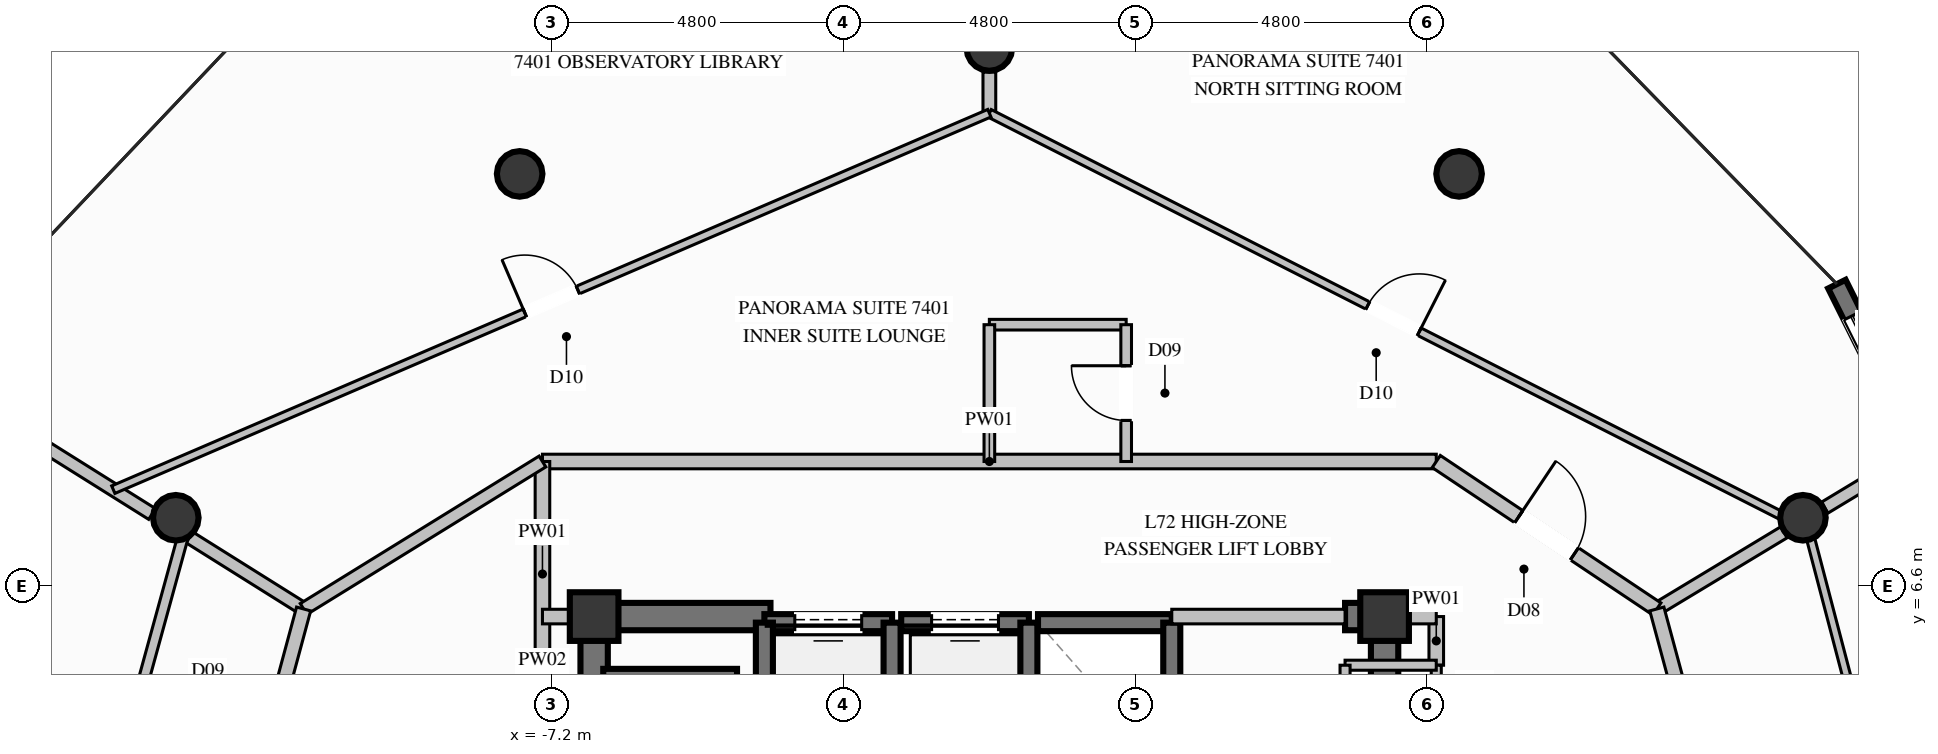
"""IFC4 building model, lengths in metres.
Left out: names, types, materials, properties, quantities, classifications, styles, units other than length and angle.
Written with IfcOpenShell. Run it as: python <this file> out.ifc"""

import sys

from ifc_helpers import new_model, si_unit, direction, frame, frame_2d, origin, origin_2d, place, context, subcontext, project, spatial, rectangle, circle, extrude, element, fill, save


model = new_model("IFC4")
c1 = context("Model", 3, precision=1e-05, world=origin(), true_north=direction((0.0, 1.0)))
c2 = subcontext(c1, "Body", "Model", "MODEL_VIEW")
j1 = project(units=[si_unit("LENGTHUNIT", "METRE"), si_unit("PLANEANGLEUNIT", "RADIAN")], contexts=[c1])
p1 = place(None, origin())
s1 = spatial("IfcSite", under=j1, at=p1, CompositionType="ELEMENT")
p2 = place(p1, origin())
s2 = spatial("IfcBuilding", under=s1, at=p2, CompositionType="ELEMENT")
p3 = place(p2, frame((0.0, 0.0, 278.2)))
s3 = spatial("IfcBuildingStorey", under=s2, at=p3, CompositionType="ELEMENT", Elevation=278.2)
for number, where, z_axis, x_axis in (
    (1, (6.5, 6.1, 0.0), (0.0, 0.0, 1.0), (1.0, 0.0, 0.0)),
    (2, (-6.5, 6.1, 0.0), (0.0, 0.0, 1.0), (1.0, 0.0, 0.0)),
):
    element("IfcColumn", number, at=place(p3, frame(where, z_axis=z_axis, x_axis=x_axis)), inside=s3, PredefinedType="COLUMN", context=c2, shape_type="SweptSolid", body=[
        extrude(rectangle(XDim=0.8, YDim=0.8, at=origin_2d()), origin(), (0.0, 0.0, 1.0), 3.8),
    ])
p4 = place(p3, frame((-6.275, 6.1, 0.0), z_axis=(0.0, 0.0, 1.0), x_axis=(1.0, 0.0, 0.0)))
e3 = element("IfcWall", 3, at=p4, inside=s3, PredefinedType="SHEAR", context=c2, shape_type="SweptSolid", body=[
    extrude(rectangle(XDim=2.675, YDim=0.45, at=frame_2d((1.337, 0.0))), origin(), (0.0, 0.0, 1.0), 3.8),
])
p5 = place(p3, frame((5.85, 6.1, 0.0), z_axis=(0.0, 0.0, 1.0), x_axis=(1.0, 0.0, 0.0)))
e4 = element("IfcWall", 4, at=p5, inside=s3, PredefinedType="SHEAR", context=c2, shape_type="SweptSolid", body=[
    extrude(rectangle(XDim=0.425, YDim=0.45, at=frame_2d((0.212, 0.0))), origin(), (0.0, 0.0, 1.0), 3.8),
])
p6 = place(p3, frame((-6.5, 2.35, 0.0), z_axis=(0.0, 0.0, 1.0), x_axis=(0.0, 1.0, 0.0)))
e5 = element("IfcWall", 5, at=p6, inside=s3, PredefinedType="SHEAR", context=c2, shape_type="SweptSolid", body=[
    extrude(rectangle(XDim=3.975, YDim=0.45, at=frame_2d((1.987, 0.0))), origin(), (0.0, 0.0, 1.0), 3.8),
])
p7 = place(p3, frame((6.5, 3.35, 0.0), z_axis=(0.0, 0.0, 1.0), x_axis=(0.0, 1.0, 0.0)))
e6 = element("IfcWall", 6, at=p7, inside=s3, PredefinedType="SHEAR", context=c2, shape_type="SweptSolid", body=[
    extrude(rectangle(XDim=2.975, YDim=0.45, at=frame_2d((1.487, 0.0))), origin(), (0.0, 0.0, 1.0), 3.8),
])
for number, where, z_axis, x_axis in (
    (7, (13.38, 7.725, 0.0), (0.0, 0.0, 1.0), (1.0, 0.0, 0.0)),
    (8, (7.725, 13.38, 0.0), (0.0, 0.0, 1.0), (1.0, 0.0, 0.0)),
    (9, (0.0, 15.45, 0.0), (0.0, 0.0, 1.0), (1.0, 0.0, 0.0)),
    (10, (-7.725, 13.38, 0.0), (0.0, 0.0, 1.0), (1.0, 0.0, 0.0)),
    (11, (-13.38, 7.725, 0.0), (0.0, 0.0, 1.0), (1.0, 0.0, 0.0)),
):
    element("IfcColumn", number, at=place(p3, frame(where, z_axis=z_axis, x_axis=x_axis)), inside=s3, PredefinedType="COLUMN", context=c2, shape_type="SweptSolid", body=[
        extrude(circle(Radius=0.375, at=origin_2d()), origin(), (0.0, 0.0, 1.0), 3.8),
    ])
p8 = place(p3, frame((13.939, 11.567, 0.0), z_axis=(0.0, 0.0, 1.0), x_axis=(0.44621303713, -0.894926771024, 0.0)))
e12 = element("IfcWall", 12, at=p8, inside=s3, PredefinedType="SOLIDWALL", context=c2, shape_type="SweptSolid", body=[
    extrude(rectangle(XDim=6.053, YDim=0.32, at=frame_2d((3.026, 0.0))), origin(), (0.0, 0.0, 1.0), 3.57),
])
p9 = place(p8, frame((0.578, 0.0, 0.35)))
e13 = element("IfcOpeningElement", 13, at=p9, cuts=e12, PredefinedType="OPENING", context=c2, shape_type="SweptSolid", body=[
    extrude(rectangle(XDim=1.8, YDim=2.6, at=frame_2d((0.9, 1.3))), frame((0.0, 0.17, 0.0), z_axis=(0.0, -1.0, 0.0), x_axis=(1.0, 0.0, 0.0)), (0.0, 0.0, 1.0), 0.34),
])
p10 = place(p3, frame((-1.6, 6.0, 0.0), z_axis=(0.0, 0.0, 1.0), x_axis=(-1.0, 0.0, 0.0)))
e14 = element("IfcWall", 14, at=p10, inside=s3, PredefinedType="SOLIDWALL", context=c2, shape_type="SweptSolid", body=[
    extrude(rectangle(XDim=2.1, YDim=0.28, at=frame_2d((1.05, 0.0))), origin(), (0.0, 0.0, 1.0), 3.57),
])
p11 = place(p10, frame((0.5, 0.0, 0.0)))
e15 = element("IfcOpeningElement", 15, at=p11, cuts=e14, PredefinedType="OPENING", context=c2, shape_type="SweptSolid", body=[
    extrude(rectangle(XDim=1.1, YDim=2.2, at=frame_2d((0.55, 1.1))), frame((0.0, 0.15, 0.0), z_axis=(0.0, -1.0, 0.0), x_axis=(1.0, 0.0, 0.0)), (0.0, 0.0, 1.0), 0.3),
])
for number, where, z_axis, x_axis in (
    (16, (-3.7, 6.0, 0.0), (0.0, 0.0, 1.0), (0.0, -1.0, 0.0)),
    (17, (-1.6, 3.5, 0.0), (0.0, 0.0, 1.0), (0.0, 1.0, 0.0)),
):
    element("IfcWall", number, at=place(p3, frame(where, z_axis=z_axis, x_axis=x_axis)), inside=s3, PredefinedType="SOLIDWALL", context=c2, shape_type="SweptSolid", body=[
        extrude(rectangle(XDim=2.5, YDim=0.28, at=frame_2d((1.25, 0.0))), origin(), (0.0, 0.0, 1.0), 3.57),
    ])
p12 = place(p3, frame((0.65, 6.0, 0.0), z_axis=(0.0, 0.0, 1.0), x_axis=(-1.0, 0.0, 0.0)))
e18 = element("IfcWall", 18, at=p12, inside=s3, PredefinedType="SOLIDWALL", context=c2, shape_type="SweptSolid", body=[
    extrude(rectangle(XDim=2.1, YDim=0.28, at=frame_2d((1.05, 0.0))), origin(), (0.0, 0.0, 1.0), 3.57),
])
p13 = place(p12, frame((0.5, 0.0, 0.0)))
e19 = element("IfcOpeningElement", 19, at=p13, cuts=e18, PredefinedType="OPENING", context=c2, shape_type="SweptSolid", body=[
    extrude(rectangle(XDim=1.1, YDim=2.2, at=frame_2d((0.55, 1.1))), frame((0.0, 0.15, 0.0), z_axis=(0.0, -1.0, 0.0), x_axis=(1.0, 0.0, 0.0)), (0.0, 0.0, 1.0), 0.3),
])
p14 = place(p3, frame((0.65, 3.5, 0.0), z_axis=(0.0, 0.0, 1.0), x_axis=(0.0, 1.0, 0.0)))
e20 = element("IfcWall", 20, at=p14, inside=s3, PredefinedType="SOLIDWALL", context=c2, shape_type="SweptSolid", body=[
    extrude(rectangle(XDim=2.5, YDim=0.28, at=frame_2d((1.25, 0.0))), origin(), (0.0, 0.0, 1.0), 3.57),
])
p15 = place(p3, frame((3.0, 6.0, 0.0), z_axis=(0.0, 0.0, 1.0), x_axis=(-1.0, 0.0, 0.0)))
e21 = element("IfcWall", 21, at=p15, inside=s3, PredefinedType="SOLIDWALL", context=c2, shape_type="SweptSolid", body=[
    extrude(rectangle(XDim=2.2, YDim=0.28, at=frame_2d((1.1, 0.0))), origin(), (0.0, 0.0, 1.0), 3.57),
])
p16 = place(p3, frame((3.0, 3.5, 0.0), z_axis=(0.0, 0.0, 1.0), x_axis=(0.0, 1.0, 0.0)))
e22 = element("IfcWall", 22, at=p16, inside=s3, PredefinedType="SOLIDWALL", context=c2, shape_type="SweptSolid", body=[
    extrude(rectangle(XDim=2.5, YDim=0.28, at=frame_2d((1.25, 0.0))), origin(), (0.0, 0.0, 1.0), 3.57),
])
p17 = place(p3, frame((-4.15, 5.1, 0.0), z_axis=(0.0, 0.0, 1.0), x_axis=(-1.0, 0.0, 0.0)))
e23 = element("IfcWall", 23, at=p17, inside=s3, PredefinedType="SOLIDWALL", context=c2, shape_type="SweptSolid", body=[
    extrude(rectangle(XDim=2.2, YDim=0.28, at=frame_2d((1.1, 0.0))), origin(), (0.0, 0.0, 1.0), 3.57),
])
p18 = place(p3, frame((-7.35, 8.65, 0.0), z_axis=(0.0, 0.0, 1.0), x_axis=(1.0, 0.0, 0.0)))
e24 = element("IfcWall", 24, at=p18, inside=s3, PredefinedType="PARTITIONING", context=c2, shape_type="SweptSolid", body=[
    extrude(rectangle(XDim=14.7, YDim=0.24, at=frame_2d((7.35, 0.0))), origin(), (0.0, 0.0, 1.0), 3.57),
])
p19 = place(p3, frame((3.0, 6.1, 0.0), z_axis=(0.0, 0.0, 1.0), x_axis=(1.0, 0.0, 0.0)))
e25 = element("IfcWall", 25, at=p19, inside=s3, PredefinedType="PARTITIONING", context=c2, shape_type="SweptSolid", body=[
    extrude(rectangle(XDim=2.85, YDim=0.24, at=frame_2d((1.425, 0.0))), origin(), (0.0, 0.0, 1.0), 2.655),
])
p20 = place(p3, frame((7.35, 5.3, 0.0), z_axis=(0.0, 0.0, 1.0), x_axis=(0.0, 1.0, 0.0)))
e26 = element("IfcWall", 26, at=p20, inside=s3, PredefinedType="PARTITIONING", context=c2, shape_type="SweptSolid", body=[
    extrude(rectangle(XDim=0.8, YDim=0.24, at=frame_2d((0.4, 0.0))), origin(), (0.0, 0.0, 1.0), 2.655),
])
p21 = place(p3, frame((6.5, 6.1, 0.0), z_axis=(0.0, 0.0, 1.0), x_axis=(1.0, 0.0, 0.0)))
e27 = element("IfcWall", 27, at=p21, inside=s3, PredefinedType="PARTITIONING", context=c2, shape_type="SweptSolid", body=[
    extrude(rectangle(XDim=0.85, YDim=0.24, at=frame_2d((0.425, 0.0))), origin(), (0.0, 0.0, 1.0), 3.011),
])
p22 = place(p3, frame((-7.35, 4.95, 0.0), z_axis=(0.0, 0.0, 1.0), x_axis=(0.0, 1.0, 0.0)))
e28 = element("IfcWall", 28, at=p22, inside=s3, PredefinedType="PARTITIONING", context=c2, shape_type="SweptSolid", body=[
    extrude(rectangle(XDim=3.7, YDim=0.24, at=frame_2d((1.85, 0.0))), origin(), (0.0, 0.0, 1.0), 2.655),
])
p23 = place(p3, frame((-7.35, 6.1, 0.0), z_axis=(0.0, 0.0, 1.0), x_axis=(1.0, 0.0, 0.0)))
e29 = element("IfcWall", 29, at=p23, inside=s3, PredefinedType="PARTITIONING", context=c2, shape_type="SweptSolid", body=[
    extrude(rectangle(XDim=0.85, YDim=0.24, at=frame_2d((0.425, 0.0))), origin(), (0.0, 0.0, 1.0), 3.011),
])
p24 = place(p3, frame((7.35, 3.35, 0.0), z_axis=(0.0, 0.0, 1.0), x_axis=(0.0, 1.0, 0.0)))
e30 = element("IfcWall", 30, at=p24, inside=s3, PredefinedType="PARTITIONING", context=c2, shape_type="SweptSolid", body=[
    extrude(rectangle(XDim=1.95, YDim=0.165, at=frame_2d((0.975, 0.0))), origin(), (0.0, 0.0, 1.0), 3.57),
])
p25 = place(p24, frame((0.5, 0.0, 0.0)))
e31 = element("IfcOpeningElement", 31, at=p25, cuts=e30, PredefinedType="OPENING", context=c2, shape_type="SweptSolid", body=[
    extrude(rectangle(XDim=0.95, YDim=2.1, at=frame_2d((0.475, 1.05))), frame((0.0, 0.093, 0.0), z_axis=(0.0, -1.0, 0.0), x_axis=(1.0, 0.0, 0.0)), (0.0, 0.0, 1.0), 0.185),
])
p26 = place(p3, frame((7.35, 5.3, 0.0), z_axis=(0.0, 0.0, 1.0), x_axis=(-1.0, 0.0, 0.0)))
e32 = element("IfcWall", 32, at=p26, inside=s3, PredefinedType="PARTITIONING", context=c2, shape_type="SweptSolid", body=[
    extrude(rectangle(XDim=1.5, YDim=0.165, at=frame_2d((0.75, 0.0))), origin(), (0.0, 0.0, 1.0), 2.655),
])
p27 = place(p3, frame((5.85, 5.3, 0.0), z_axis=(0.0, 0.0, 1.0), x_axis=(0.0, -1.0, 0.0)))
e33 = element("IfcWall", 33, at=p27, inside=s3, PredefinedType="PARTITIONING", context=c2, shape_type="SweptSolid", body=[
    extrude(rectangle(XDim=1.95, YDim=0.165, at=frame_2d((0.975, 0.0))), origin(), (0.0, 0.0, 1.0), 2.655),
])
p28 = place(p3, frame((10.978, 6.225, 0.0), z_axis=(0.0, 0.0, 1.0), x_axis=(0.856173916647, 0.516687743664, 0.0)))
e34 = element("IfcWall", 34, at=p28, inside=s3, PredefinedType="PARTITIONING", context=c2, shape_type="SweptSolid", body=[
    extrude(rectangle(XDim=2.439, YDim=0.21, at=frame_2d((1.219, 0.0))), origin(), (0.0, 0.0, 1.0), 3.011),
])
p29 = place(p3, frame((13.738, 7.891, 0.0), z_axis=(0.0, 0.0, 1.0), x_axis=(0.856151167904, 0.516725437439, 0.0)))
e35 = element("IfcWall", 35, at=p29, inside=s3, PredefinedType="PARTITIONING", context=c2, shape_type="SweptSolid", body=[
    extrude(rectangle(XDim=1.786, YDim=0.21, at=frame_2d((0.893, 0.0))), origin(), (0.0, 0.0, 1.0), 3.57),
])
p30 = place(p3, frame((-11.278, 6.225, 0.0), z_axis=(0.0, 0.0, 1.0), x_axis=(-0.847328563413, 0.531069021525, 0.0)))
e36 = element("IfcWall", 36, at=p30, inside=s3, PredefinedType="PARTITIONING", context=c2, shape_type="SweptSolid", body=[
    extrude(rectangle(XDim=2.214, YDim=0.21, at=frame_2d((1.107, 0.0))), origin(), (0.0, 0.0, 1.0), 3.011),
])
p31 = place(p3, frame((-13.77, 7.787, 0.0), z_axis=(0.0, 0.0, 1.0), x_axis=(-0.847396390163, 0.530960787572, 0.0)))
e37 = element("IfcWall", 37, at=p31, inside=s3, PredefinedType="PARTITIONING", context=c2, shape_type="SweptSolid", body=[
    extrude(rectangle(XDim=3.9, YDim=0.21, at=frame_2d((1.95, 0.0))), origin(), (0.0, 0.0, 1.0), 3.57),
])
for number, where, z_axis, x_axis in (
    (38, (0.0, 10.9, 0.0), (0.0, 0.0, 1.0), (1.0, 0.0, 0.0)),
    (39, (0.0, 10.9, 0.0), (0.0, 0.0, 1.0), (0.0, -1.0, 0.0)),
):
    element("IfcWall", number, at=place(p3, frame(where, z_axis=z_axis, x_axis=x_axis)), inside=s3, PredefinedType="PLUMBINGWALL", context=c2, shape_type="SweptSolid", body=[
        extrude(rectangle(XDim=2.25, YDim=0.175, at=frame_2d((1.125, 0.0))), origin(), (0.0, 0.0, 1.0), 3.57),
    ])
p32 = place(p3, frame((2.25, 8.65, 0.0), z_axis=(0.0, 0.0, 1.0), x_axis=(0.0, 1.0, 0.0)))
e40 = element("IfcWall", 40, at=p32, inside=s3, PredefinedType="PLUMBINGWALL", context=c2, shape_type="SweptSolid", body=[
    extrude(rectangle(XDim=2.25, YDim=0.175, at=frame_2d((1.125, 0.0))), origin(), (0.0, 0.0, 1.0), 3.57),
])
p33 = place(p32, frame((0.675, 0.0, 0.0)))
e41 = element("IfcOpeningElement", 41, at=p33, cuts=e40, PredefinedType="OPENING", context=c2, shape_type="SweptSolid", body=[
    extrude(rectangle(XDim=0.9, YDim=2.1, at=frame_2d((0.45, 1.05))), frame((0.0, 0.098, 0.0), z_axis=(0.0, -1.0, 0.0), x_axis=(1.0, 0.0, 0.0)), (0.0, 0.0, 1.0), 0.195),
])
p34 = place(p3, frame((-11.278, 6.225, 0.0), z_axis=(0.0, 0.0, 1.0), x_axis=(0.85092385233, 0.525289060933, 0.0)))
e42 = element("IfcWall", 42, at=p34, inside=s3, PredefinedType="PARTITIONING", context=c2, shape_type="SweptSolid", body=[
    extrude(rectangle(XDim=4.616, YDim=0.21, at=frame_2d((2.308, 0.0))), origin(), (0.0, 0.0, 1.0), 3.57),
])
p35 = place(p3, frame((7.35, 8.65, 0.0), z_axis=(0.0, 0.0, 1.0), x_axis=(0.831395547998, -0.555681062094, 0.0)))
e43 = element("IfcWall", 43, at=p35, inside=s3, PredefinedType="PARTITIONING", context=c2, shape_type="SweptSolid", body=[
    extrude(rectangle(XDim=4.364, YDim=0.24, at=frame_2d((2.182, 0.0))), origin(), (0.0, 0.0, 1.0), 3.57),
])
p36 = place(p35, frame((1.632, 0.0, 0.0)))
e44 = element("IfcOpeningElement", 44, at=p36, cuts=e43, PredefinedType="OPENING", context=c2, shape_type="SweptSolid", body=[
    extrude(rectangle(XDim=1.1, YDim=2.3, at=frame_2d((0.55, 1.15))), frame((0.0, 0.13, 0.0), z_axis=(0.0, -1.0, 0.0), x_axis=(1.0, 0.0, 0.0)), (0.0, 0.0, 1.0), 0.26),
])
p37 = place(p3, frame((0.0, 14.378, 0.0), z_axis=(0.0, 0.0, 1.0), x_axis=(0.0, 1.0, 0.0)))
e45 = element("IfcWall", 45, at=p37, inside=s3, PredefinedType="PARTITIONING", context=c2, shape_type="SweptSolid", body=[
    extrude(rectangle(XDim=0.677, YDim=0.21, at=frame_2d((0.338, 0.0))), origin(), (0.0, 0.0, 1.0), 3.57),
])
p38 = place(p3, frame((0.0, 14.378, 0.0), z_axis=(0.0, 0.0, 1.0), x_axis=(0.891513801847, -0.452993533195, 0.0)))
e46 = element("IfcWall", 46, at=p38, inside=s3, PredefinedType="PARTITIONING", context=c2, shape_type="SweptSolid", body=[
    extrude(rectangle(XDim=14.912, YDim=0.135, at=frame_2d((7.456, 0.0))), origin(), (0.0, 0.0, 1.0), 3.011),
])
p39 = place(p38, frame((6.981, 0.0, 0.0)))
e47 = element("IfcOpeningElement", 47, at=p39, cuts=e46, PredefinedType="OPENING", context=c2, shape_type="SweptSolid", body=[
    extrude(rectangle(XDim=0.95, YDim=2.1, at=frame_2d((0.475, 1.05))), frame((0.0, 0.078, 0.0), z_axis=(0.0, -1.0, 0.0), x_axis=(1.0, 0.0, 0.0)), (0.0, 0.0, 1.0), 0.155),
])
p40 = place(p3, frame((-14.408, 8.187, 0.0), z_axis=(0.0, 0.0, 1.0), x_axis=(0.918773394329, 0.394785321247, 0.0)))
e48 = element("IfcWall", 48, at=p40, inside=s3, PredefinedType="PARTITIONING", context=c2, shape_type="SweptSolid", body=[
    extrude(rectangle(XDim=15.682, YDim=0.135, at=frame_2d((7.841, 0.0))), origin(), (0.0, 0.0, 1.0), 3.57),
])
p41 = place(p40, frame((7.366, 0.0, 0.0)))
e49 = element("IfcOpeningElement", 49, at=p41, cuts=e48, PredefinedType="OPENING", context=c2, shape_type="SweptSolid", body=[
    extrude(rectangle(XDim=0.95, YDim=2.1, at=frame_2d((0.475, 1.05))), frame((0.0, 0.078, 0.0), z_axis=(0.0, -1.0, 0.0), x_axis=(1.0, 0.0, 0.0)), (0.0, 0.0, 1.0), 0.155),
])
p42 = place(p3, frame((-11.278, 6.225, 0.0), z_axis=(0.0, 0.0, 1.0), x_axis=(-0.260614169726, -0.965443035367, 0.0)))
e50 = element("IfcWall", 50, at=p42, inside=s3, PredefinedType="PARTITIONING", context=c2, shape_type="SweptSolid", body=[
    extrude(rectangle(XDim=2.774, YDim=0.24, at=frame_2d((1.387, 0.0))), origin(), (0.0, 0.0, 1.0), 3.57),
])
p43 = place(p3, frame((-13.249, 7.46, 0.0), z_axis=(0.0, 0.0, 1.0), x_axis=(-0.264854882297, -0.96428828227, 0.0)))
e51 = element("IfcWall", 51, at=p43, inside=s3, PredefinedType="PLUMBINGWALL", context=c2, shape_type="SweptSolid", body=[
    extrude(rectangle(XDim=3.293, YDim=0.175, at=frame_2d((1.646, 0.0))), origin(), (0.0, 0.0, 1.0), 3.137),
])
p44 = place(p3, frame((12.7, -0.15, 0.0), z_axis=(0.0, 0.0, 1.0), x_axis=(-0.260760959349, 0.965403398626, 0.0)))
e52 = element("IfcWall", 52, at=p44, inside=s3, PredefinedType="PARTITIONING", context=c2, shape_type="SweptSolid", body=[
    extrude(rectangle(XDim=6.604, YDim=0.24, at=frame_2d((3.302, 0.0))), origin(), (0.0, 0.0, 1.0), 3.57),
])
p45 = place(p3, frame((15.459, -0.065, 0.0), z_axis=(0.0, 0.0, 1.0), x_axis=(-0.253589081107, 0.967312037526, 0.0)))
e53 = element("IfcWall", 53, at=p45, inside=s3, PredefinedType="PARTITIONING", context=c2, shape_type="SweptSolid", body=[
    extrude(rectangle(XDim=8.028, YDim=0.135, at=frame_2d((4.014, 0.0))), origin(), (0.0, 0.0, 1.0), 3.137),
])
p46 = place(p45, frame((3.539, 0.0, 0.0)))
e54 = element("IfcOpeningElement", 54, at=p46, cuts=e53, PredefinedType="OPENING", context=c2, shape_type="SweptSolid", body=[
    extrude(rectangle(XDim=0.95, YDim=2.1, at=frame_2d((0.475, 1.05))), frame((0.0, 0.078, 0.0), z_axis=(0.0, -1.0, 0.0), x_axis=(1.0, 0.0, 0.0)), (0.0, 0.0, 1.0), 0.155),
])
p47 = place(p9, origin())
e55 = element("IfcWindow", 55, at=p47, inside=s3, PartitioningType="SINGLE_PANEL", PredefinedType="WINDOW", context=c2, shape_type="SweptSolid", body=[
    extrude(rectangle(XDim=1.8, YDim=2.6, at=frame_2d((0.9, 1.3))), frame((0.0, 0.03, 0.0), z_axis=(0.0, -1.0, 0.0), x_axis=(1.0, 0.0, 0.0)), (0.0, 0.0, 1.0), 0.06),
])
fill(e13, e55)
p48 = place(p11, origin())
e56 = element("IfcDoor", 56, at=p48, inside=s3, OperationType="SLIDING_TO_LEFT", PredefinedType="DOOR", context=c2, shape_type="SweptSolid", body=[
    extrude(rectangle(XDim=1.1, YDim=2.2, at=frame_2d((0.55, 1.1))), frame((0.0, 0.025, 0.0), z_axis=(0.0, -1.0, 0.0), x_axis=(1.0, 0.0, 0.0)), (0.0, 0.0, 1.0), 0.05),
])
fill(e15, e56)
p49 = place(p13, origin())
e57 = element("IfcDoor", 57, at=p49, inside=s3, OperationType="SLIDING_TO_LEFT", PredefinedType="DOOR", context=c2, shape_type="SweptSolid", body=[
    extrude(rectangle(XDim=1.1, YDim=2.2, at=frame_2d((0.55, 1.1))), frame((0.0, 0.025, 0.0), z_axis=(0.0, -1.0, 0.0), x_axis=(1.0, 0.0, 0.0)), (0.0, 0.0, 1.0), 0.05),
])
fill(e19, e57)
p50 = place(p33, origin())
e58 = element("IfcDoor", 58, at=p50, inside=s3, OperationType="SINGLE_SWING_RIGHT", PredefinedType="DOOR", context=c2, shape_type="SweptSolid", body=[
    extrude(rectangle(XDim=0.9, YDim=2.1, at=frame_2d((0.45, 1.05))), frame((0.0, 0.025, 0.0), z_axis=(0.0, -1.0, 0.0), x_axis=(1.0, 0.0, 0.0)), (0.0, 0.0, 1.0), 0.05),
])
fill(e41, e58)
p51 = place(p36, origin())
e59 = element("IfcDoor", 59, at=p51, inside=s3, OperationType="SINGLE_SWING_LEFT", PredefinedType="DOOR", context=c2, shape_type="SweptSolid", body=[
    extrude(rectangle(XDim=1.1, YDim=2.3, at=frame_2d((0.55, 1.15))), frame((0.0, 0.025, 0.0), z_axis=(0.0, -1.0, 0.0), x_axis=(1.0, 0.0, 0.0)), (0.0, 0.0, 1.0), 0.05),
])
fill(e44, e59)
p52 = place(p39, origin())
e60 = element("IfcDoor", 60, at=p52, inside=s3, OperationType="SINGLE_SWING_RIGHT", PredefinedType="DOOR", context=c2, shape_type="SweptSolid", body=[
    extrude(rectangle(XDim=0.95, YDim=2.1, at=frame_2d((0.475, 1.05))), frame((0.0, 0.025, 0.0), z_axis=(0.0, -1.0, 0.0), x_axis=(1.0, 0.0, 0.0)), (0.0, 0.0, 1.0), 0.05),
])
fill(e47, e60)
p53 = place(p41, origin())
e61 = element("IfcDoor", 61, at=p53, inside=s3, OperationType="SINGLE_SWING_LEFT", PredefinedType="DOOR", context=c2, shape_type="SweptSolid", body=[
    extrude(rectangle(XDim=0.95, YDim=2.1, at=frame_2d((0.475, 1.05))), frame((0.0, 0.025, 0.0), z_axis=(0.0, -1.0, 0.0), x_axis=(1.0, 0.0, 0.0)), (0.0, 0.0, 1.0), 0.05),
])
fill(e49, e61)
save(model, sys.argv[1])
